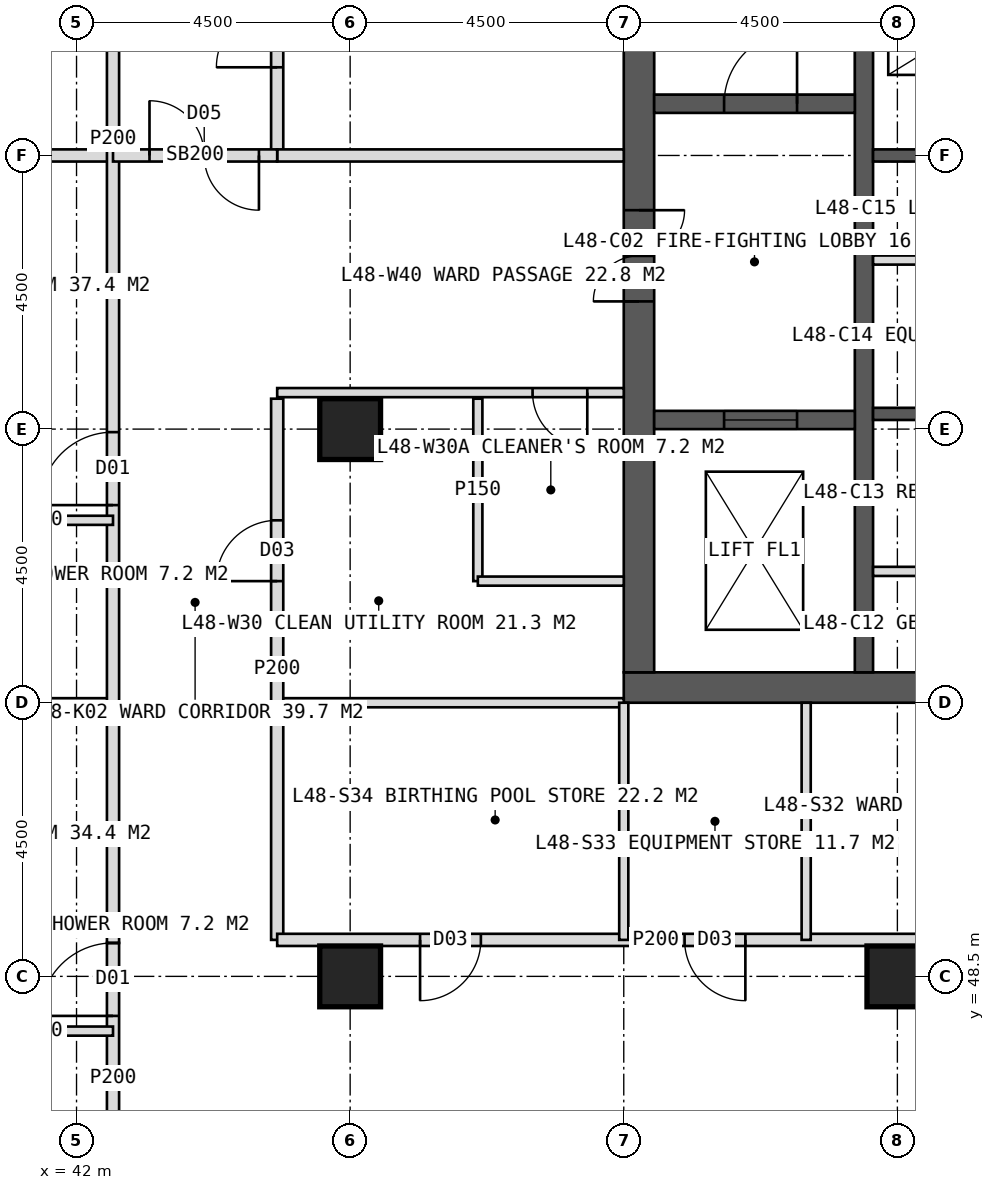
"""IFC4 building model, lengths in metres.
Left out: names, types, materials, properties, quantities, classifications, styles, units other than length and angle.
Written with IfcOpenShell. Run it as: python <this file> out.ifc"""

import sys

from ifc_helpers import new_model, si_unit, direction, frame, frame_2d, origin, origin_2d, place, context, subcontext, project, spatial, rectangle, hollow_rectangle, extrude, element, fill, save


model = new_model("IFC4")
c1 = context("Model", 3, precision=1e-05, world=origin(), true_north=direction((0.0, 1.0)))
c2 = subcontext(c1, "Body", "Model", "MODEL_VIEW")
j1 = project(units=[si_unit("LENGTHUNIT", "METRE"), si_unit("PLANEANGLEUNIT", "RADIAN")], contexts=[c1])
p1 = place(None, origin())
s1 = spatial("IfcSite", under=j1, at=p1, CompositionType="ELEMENT")
p2 = place(p1, origin())
s2 = spatial("IfcBuilding", under=s1, at=p2, CompositionType="ELEMENT")
p3 = place(p2, frame((0.0, 0.0, 201.0)))
s3 = spatial("IfcBuildingStorey", under=s2, at=p3, CompositionType="ELEMENT", Elevation=201.0)
p4 = place(p3, frame((51.0, 53.25, 0.0), z_axis=(0.0, 0.0, 1.0), x_axis=(1.0, 0.0, 0.0)))
e1 = element("IfcWall", 1, at=p4, inside=s3, PredefinedType="SHEAR", context=c2, shape_type="SweptSolid", body=[
    extrude(rectangle(XDim=18.0, YDim=0.5, at=frame_2d((9.0, 0.0))), origin(), (0.0, 0.0, 1.0), 4.0),
])
p5 = place(p4, frame((8.1, 0.0, 0.0)))
e2 = element("IfcOpeningElement", 2, at=p5, cuts=e1, PredefinedType="OPENING", context=c2, shape_type="SweptSolid", body=[
    extrude(rectangle(XDim=1.8, YDim=2.2, at=frame_2d((0.9, 1.1))), frame((0.0, 0.26, 0.0), z_axis=(0.0, -1.0, 0.0), x_axis=(1.0, 0.0, 0.0)), (0.0, 0.0, 1.0), 0.52),
])
p6 = place(p3, frame((51.25, 53.5, 0.0), z_axis=(0.0, 0.0, 1.0), x_axis=(0.0, 1.0, 0.0)))
e3 = element("IfcWall", 3, at=p6, inside=s3, PredefinedType="SHEAR", context=c2, shape_type="SweptSolid", body=[
    extrude(rectangle(XDim=17.0, YDim=0.5, at=frame_2d((8.5, 0.0))), origin(), (0.0, 0.0, 1.0), 4.0),
])
p7 = place(p6, frame((6.1, 0.0, 0.0)))
e4 = element("IfcOpeningElement", 4, at=p7, cuts=e3, PredefinedType="OPENING", context=c2, shape_type="SweptSolid", body=[
    extrude(rectangle(XDim=1.5, YDim=2.2, at=frame_2d((0.75, 1.1))), frame((0.0, 0.26, 0.0), z_axis=(0.0, -1.0, 0.0), x_axis=(1.0, 0.0, 0.0)), (0.0, 0.0, 1.0), 0.52),
])
p8 = place(p3, frame((54.95, 53.5, 0.0), z_axis=(0.0, 0.0, 1.0), x_axis=(0.0, 1.0, 0.0)))
e5 = element("IfcWall", 5, at=p8, inside=s3, PredefinedType="SHEAR", context=c2, shape_type="SweptSolid", body=[
    extrude(rectangle(XDim=17.0, YDim=0.3, at=frame_2d((8.5, 0.0))), origin(), (0.0, 0.0, 1.0), 4.0),
])
for number, where, z_axis, x_axis in (
    (6, (55.1, 57.75, 0.0), (0.0, 0.0, 1.0), (1.0, 0.0, 0.0)),
    (7, (55.1, 62.0, 0.0), (0.0, 0.0, 1.0), (1.0, 0.0, 0.0)),
):
    element("IfcWall", number, at=place(p3, frame(where, z_axis=z_axis, x_axis=x_axis)), inside=s3, PredefinedType="SHEAR", context=c2, shape_type="SweptSolid", body=[
        extrude(rectangle(XDim=3.05, YDim=0.2, at=frame_2d((1.525, 0.0))), origin(), (0.0, 0.0, 1.0), 4.0),
    ])
p9 = place(p3, frame((51.5, 62.85, 0.0), z_axis=(0.0, 0.0, 1.0), x_axis=(1.0, 0.0, 0.0)))
e8 = element("IfcWall", 8, at=p9, inside=s3, PredefinedType="SHEAR", context=c2, shape_type="SweptSolid", body=[
    extrude(rectangle(XDim=3.3, YDim=0.3, at=frame_2d((1.65, 0.0))), origin(), (0.0, 0.0, 1.0), 4.0),
])
p10 = place(p9, frame((1.15, 0.0, 0.0)))
e9 = element("IfcOpeningElement", 9, at=p10, cuts=e8, PredefinedType="OPENING", context=c2, shape_type="SweptSolid", body=[
    extrude(rectangle(XDim=1.2, YDim=2.1, at=frame_2d((0.6, 1.05))), frame((0.0, 0.16, 0.0), z_axis=(0.0, -1.0, 0.0), x_axis=(1.0, 0.0, 0.0)), (0.0, 0.0, 1.0), 0.32),
])
p11 = place(p3, frame((51.5, 57.65, 0.0), z_axis=(0.0, 0.0, 1.0), x_axis=(1.0, 0.0, 0.0)))
e10 = element("IfcWall", 10, at=p11, inside=s3, PredefinedType="SHEAR", context=c2, shape_type="SweptSolid", body=[
    extrude(rectangle(XDim=3.3, YDim=0.3, at=frame_2d((1.65, 0.0))), origin(), (0.0, 0.0, 1.0), 4.0),
])
p12 = place(p11, frame((1.15, 0.0, 0.0)))
e11 = element("IfcOpeningElement", 11, at=p12, cuts=e10, PredefinedType="OPENING", context=c2, shape_type="SweptSolid", body=[
    extrude(rectangle(XDim=1.2, YDim=2.2, at=frame_2d((0.6, 1.1))), frame((0.0, 0.16, 0.0), z_axis=(0.0, -1.0, 0.0), x_axis=(1.0, 0.0, 0.0)), (0.0, 0.0, 1.0), 0.32),
])
for number, where, z_axis, x_axis in (
    (12, (46.5, 48.5, 0.0), (0.0, 0.0, 1.0), (1.0, 0.0, 0.0)),
    (13, (55.5, 48.5, 0.0), (0.0, 0.0, 1.0), (1.0, 0.0, 0.0)),
    (14, (46.5, 57.5, 0.0), (0.0, 0.0, 1.0), (1.0, 0.0, 0.0)),
):
    element("IfcColumn", number, at=place(p3, frame(where, z_axis=z_axis, x_axis=x_axis)), inside=s3, PredefinedType="COLUMN", context=c2, shape_type="SweptSolid", body=[
        extrude(hollow_rectangle(XDim=1.0, YDim=1.0, WallThickness=0.1, at=origin_2d()), origin(), (0.0, 0.0, 1.0), 4.0),
    ])
p13 = place(p3, frame((42.6, 53.0, 0.0), z_axis=(0.0, 0.0, 1.0), x_axis=(-1.0, 0.0, 0.0)))
e15 = element("IfcWall", 15, at=p13, inside=s3, PredefinedType="PARTITIONING", context=c2, shape_type="SweptSolid", body=[
    extrude(rectangle(XDim=4.95, YDim=0.15, at=frame_2d((2.475, 0.0))), origin(), (0.0, 0.0, 1.0), 3.75),
])
p14 = place(p3, frame((42.6, 62.0, 0.0), z_axis=(0.0, 0.0, 1.0), x_axis=(-1.0, 0.0, 0.0)))
e16 = element("IfcWall", 16, at=p14, inside=s3, PredefinedType="SOLIDWALL", context=c2, shape_type="SweptSolid", body=[
    extrude(rectangle(XDim=4.95, YDim=0.2, at=frame_2d((2.475, 0.0))), origin(), (0.0, 0.0, 1.0), 2.95),
])
p15 = place(p3, frame((42.6, 44.6, 0.0), z_axis=(0.0, 0.0, 1.0), x_axis=(0.0, 1.0, 0.0)))
e17 = element("IfcWall", 17, at=p15, inside=s3, PredefinedType="PARTITIONING", context=c2, shape_type="SweptSolid", body=[
    extrude(rectangle(XDim=4.45, YDim=0.2, at=frame_2d((2.225, 0.0))), origin(), (0.0, 0.0, 1.0), 2.85),
])
p16 = place(p15, frame((3.25, 0.0, 0.0)))
e18 = element("IfcOpeningElement", 18, at=p16, cuts=e17, PredefinedType="OPENING", context=c2, shape_type="SweptSolid", body=[
    extrude(rectangle(XDim=1.2, YDim=2.2, at=frame_2d((0.6, 1.1))), frame((0.0, 0.11, 0.0), z_axis=(0.0, -1.0, 0.0), x_axis=(1.0, 0.0, 0.0)), (0.0, 0.0, 1.0), 0.22),
])
p17 = place(p3, frame((42.6, 49.05, 0.0), z_axis=(0.0, 0.0, 1.0), x_axis=(0.0, 1.0, 0.0)))
e19 = element("IfcWall", 19, at=p17, inside=s3, PredefinedType="PARTITIONING", context=c2, shape_type="SweptSolid", body=[
    extrude(rectangle(XDim=26.45, YDim=0.2, at=frame_2d((13.225, 0.0))), origin(), (0.0, 0.0, 1.0), 3.75),
])
p18 = place(p17, frame((7.2, 0.0, 0.0)))
e20 = element("IfcOpeningElement", 20, at=p18, cuts=e19, PredefinedType="OPENING", context=c2, shape_type="SweptSolid", body=[
    extrude(rectangle(XDim=1.2, YDim=2.2, at=frame_2d((0.6, 1.1))), frame((0.0, 0.11, 0.0), z_axis=(0.0, -1.0, 0.0), x_axis=(1.0, 0.0, 0.0)), (0.0, 0.0, 1.0), 0.22),
])
p19 = place(p17, frame((16.2, 0.0, 0.0)))
e21 = element("IfcOpeningElement", 21, at=p19, cuts=e19, PredefinedType="OPENING", context=c2, shape_type="SweptSolid", body=[
    extrude(rectangle(XDim=1.2, YDim=2.2, at=frame_2d((0.6, 1.1))), frame((0.0, 0.11, 0.0), z_axis=(0.0, -1.0, 0.0), x_axis=(1.0, 0.0, 0.0)), (0.0, 0.0, 1.0), 0.22),
])
p20 = place(p17, frame((25.2, 0.0, 0.0)))
e22 = element("IfcOpeningElement", 22, at=p20, cuts=e19, PredefinedType="OPENING", context=c2, shape_type="SweptSolid", body=[
    extrude(rectangle(XDim=1.2, YDim=2.2, at=frame_2d((0.6, 1.1))), frame((0.0, 0.11, 0.0), z_axis=(0.0, -1.0, 0.0), x_axis=(1.0, 0.0, 0.0)), (0.0, 0.0, 1.0), 0.22),
])
for number, where, z_axis, x_axis in (
    (23, (42.6, 47.6, 0.0), (0.0, 0.0, 1.0), (-1.0, 0.0, 0.0)),
    (24, (42.6, 56.0, 0.0), (0.0, 0.0, 1.0), (-1.0, 0.0, 0.0)),
):
    element("IfcWall", number, at=place(p3, frame(where, z_axis=z_axis, x_axis=x_axis)), inside=s3, PredefinedType="PARTITIONING", context=c2, shape_type="SweptSolid", body=[
        extrude(rectangle(XDim=2.4, YDim=0.15, at=frame_2d((1.2, 0.0))), origin(), (0.0, 0.0, 1.0), 3.75),
    ])
p21 = place(p3, frame((51.0, 53.0, 0.0), z_axis=(0.0, 0.0, 1.0), x_axis=(-1.0, 0.0, 0.0)))
e25 = element("IfcWall", 25, at=p21, inside=s3, PredefinedType="PARTITIONING", context=c2, shape_type="SweptSolid", body=[
    extrude(rectangle(XDim=5.7, YDim=0.15, at=frame_2d((2.85, 0.0))), origin(), (0.0, 0.0, 1.0), 3.75),
])
p22 = place(p3, frame((45.3, 49.1, 0.0), z_axis=(0.0, 0.0, 1.0), x_axis=(0.0, 1.0, 0.0)))
e26 = element("IfcWall", 26, at=p22, inside=s3, PredefinedType="PARTITIONING", context=c2, shape_type="SweptSolid", body=[
    extrude(rectangle(XDim=8.9, YDim=0.2, at=frame_2d((4.45, 0.0))), origin(), (0.0, 0.0, 1.0), 3.75),
])
p23 = place(p22, frame((5.9, 0.0, 0.0)))
e27 = element("IfcOpeningElement", 27, at=p23, cuts=e26, PredefinedType="OPENING", context=c2, shape_type="SweptSolid", body=[
    extrude(rectangle(XDim=1.0, YDim=2.1, at=frame_2d((0.5, 1.05))), frame((0.0, 0.11, 0.0), z_axis=(0.0, -1.0, 0.0), x_axis=(1.0, 0.0, 0.0)), (0.0, 0.0, 1.0), 0.22),
])
p24 = place(p3, frame((45.3, 62.0, 0.0), z_axis=(0.0, 0.0, 1.0), x_axis=(0.0, 1.0, 0.0)))
e28 = element("IfcWall", 28, at=p24, inside=s3, PredefinedType="PARTITIONING", context=c2, shape_type="SweptSolid", body=[
    extrude(rectangle(XDim=14.7, YDim=0.2, at=frame_2d((7.35, 0.0))), origin(), (0.0, 0.0, 1.0), 3.75),
])
p25 = place(p24, frame((1.45, 0.0, 0.0)))
e29 = element("IfcOpeningElement", 29, at=p25, cuts=e28, PredefinedType="OPENING", context=c2, shape_type="SweptSolid", body=[
    extrude(rectangle(XDim=1.0, YDim=2.1, at=frame_2d((0.5, 1.05))), frame((0.0, 0.11, 0.0), z_axis=(0.0, -1.0, 0.0), x_axis=(1.0, 0.0, 0.0)), (0.0, 0.0, 1.0), 0.22),
])
p26 = place(p24, frame((11.35, 0.0, 0.0)))
e30 = element("IfcOpeningElement", 30, at=p26, cuts=e28, PredefinedType="OPENING", context=c2, shape_type="SweptSolid", body=[
    extrude(rectangle(XDim=1.0, YDim=2.1, at=frame_2d((0.5, 1.05))), frame((0.0, 0.11, 0.0), z_axis=(0.0, -1.0, 0.0), x_axis=(1.0, 0.0, 0.0)), (0.0, 0.0, 1.0), 0.22),
])
p27 = place(p3, frame((51.0, 58.1, 0.0), z_axis=(0.0, 0.0, 1.0), x_axis=(-1.0, 0.0, 0.0)))
e31 = element("IfcWall", 31, at=p27, inside=s3, PredefinedType="PARTITIONING", context=c2, shape_type="SweptSolid", body=[
    extrude(rectangle(XDim=5.7, YDim=0.15, at=frame_2d((2.85, 0.0))), origin(), (0.0, 0.0, 1.0), 3.75),
])
p28 = place(p27, frame((0.6, 0.0, 0.0)))
e32 = element("IfcOpeningElement", 32, at=p28, cuts=e31, PredefinedType="OPENING", context=c2, shape_type="SweptSolid", body=[
    extrude(rectangle(XDim=0.9, YDim=2.1, at=frame_2d((0.45, 1.05))), frame((0.0, 0.085, 0.0), z_axis=(0.0, -1.0, 0.0), x_axis=(1.0, 0.0, 0.0)), (0.0, 0.0, 1.0), 0.17),
])
p29 = place(p3, frame((51.0, 62.0, 0.0), z_axis=(0.0, 0.0, 1.0), x_axis=(-1.0, 0.0, 0.0)))
e33 = element("IfcWall", 33, at=p29, inside=s3, PredefinedType="SOLIDWALL", context=c2, shape_type="SweptSolid", body=[
    extrude(rectangle(XDim=5.7, YDim=0.2, at=frame_2d((2.85, 0.0))), origin(), (0.0, 0.0, 1.0), 2.95),
])
p30 = place(p3, frame((48.6, 55.0, 0.0), z_axis=(0.0, 0.0, 1.0), x_axis=(0.0, 1.0, 0.0)))
e34 = element("IfcWall", 34, at=p30, inside=s3, PredefinedType="PARTITIONING", context=c2, shape_type="SweptSolid", body=[
    extrude(rectangle(XDim=3.0, YDim=0.15, at=frame_2d((1.5, 0.0))), origin(), (0.0, 0.0, 1.0), 3.75),
])
p31 = place(p3, frame((51.0, 55.0, 0.0), z_axis=(0.0, 0.0, 1.0), x_axis=(-1.0, 0.0, 0.0)))
e35 = element("IfcWall", 35, at=p31, inside=s3, PredefinedType="PARTITIONING", context=c2, shape_type="SweptSolid", body=[
    extrude(rectangle(XDim=2.4, YDim=0.15, at=frame_2d((1.2, 0.0))), origin(), (0.0, 0.0, 1.0), 3.75),
])
p32 = place(p3, frame((57.75, 49.1, 0.0), z_axis=(0.0, 0.0, 1.0), x_axis=(-1.0, 0.0, 0.0)))
e36 = element("IfcWall", 36, at=p32, inside=s3, PredefinedType="PARTITIONING", context=c2, shape_type="SweptSolid", body=[
    extrude(rectangle(XDim=12.45, YDim=0.2, at=frame_2d((6.225, 0.0))), origin(), (0.0, 0.0, 1.0), 3.75),
])
p33 = place(p32, frame((0.325, 0.0, 0.0)))
e37 = element("IfcOpeningElement", 37, at=p33, cuts=e36, PredefinedType="OPENING", context=c2, shape_type="SweptSolid", body=[
    extrude(rectangle(XDim=1.0, YDim=2.1, at=frame_2d((0.5, 1.05))), frame((0.0, 0.11, 0.0), z_axis=(0.0, -1.0, 0.0), x_axis=(1.0, 0.0, 0.0)), (0.0, 0.0, 1.0), 0.22),
])
p34 = place(p32, frame((4.75, 0.0, 0.0)))
e38 = element("IfcOpeningElement", 38, at=p34, cuts=e36, PredefinedType="OPENING", context=c2, shape_type="SweptSolid", body=[
    extrude(rectangle(XDim=1.0, YDim=2.1, at=frame_2d((0.5, 1.05))), frame((0.0, 0.11, 0.0), z_axis=(0.0, -1.0, 0.0), x_axis=(1.0, 0.0, 0.0)), (0.0, 0.0, 1.0), 0.22),
])
p35 = place(p32, frame((9.1, 0.0, 0.0)))
e39 = element("IfcOpeningElement", 39, at=p35, cuts=e36, PredefinedType="OPENING", context=c2, shape_type="SweptSolid", body=[
    extrude(rectangle(XDim=1.0, YDim=2.1, at=frame_2d((0.5, 1.05))), frame((0.0, 0.11, 0.0), z_axis=(0.0, -1.0, 0.0), x_axis=(1.0, 0.0, 0.0)), (0.0, 0.0, 1.0), 0.22),
])
for number, where, z_axis, x_axis in (
    (40, (54.0, 53.0, 0.0), (0.0, 0.0, 1.0), (0.0, -1.0, 0.0)),
    (41, (51.0, 53.0, 0.0), (0.0, 0.0, 1.0), (0.0, -1.0, 0.0)),
):
    element("IfcWall", number, at=place(p3, frame(where, z_axis=z_axis, x_axis=x_axis)), inside=s3, PredefinedType="PARTITIONING", context=c2, shape_type="SweptSolid", body=[
        extrude(rectangle(XDim=3.9, YDim=0.15, at=frame_2d((1.95, 0.0))), origin(), (0.0, 0.0, 1.0), 3.75),
    ])
p36 = place(p3, frame((45.3, 62.0, 0.0), z_axis=(0.0, 0.0, 1.0), x_axis=(-1.0, 0.0, 0.0)))
e42 = element("IfcWall", 42, at=p36, inside=s3, PredefinedType="SOLIDWALL", context=c2, shape_type="SweptSolid", body=[
    extrude(rectangle(XDim=2.7, YDim=0.2, at=frame_2d((1.35, 0.0))), origin(), (0.0, 0.0, 1.0), 2.95),
])
p37 = place(p36, frame((0.3, 0.0, 0.0)))
e43 = element("IfcOpeningElement", 43, at=p37, cuts=e42, PredefinedType="OPENING", context=c2, shape_type="SweptSolid", body=[
    extrude(rectangle(XDim=1.8, YDim=2.2, at=frame_2d((0.9, 1.1))), frame((0.0, 0.11, 0.0), z_axis=(0.0, -1.0, 0.0), x_axis=(1.0, 0.0, 0.0)), (0.0, 0.0, 1.0), 0.22),
])
for number, where, z_axis, x_axis in (
    (44, (55.1, 55.16, 0.0), (0.0, 0.0, 1.0), (1.0, 0.0, 0.0)),
    (45, (55.1, 60.28, 0.0), (0.0, 0.0, 1.0), (1.0, 0.0, 0.0)),
):
    element("IfcWall", number, at=place(p3, frame(where, z_axis=z_axis, x_axis=x_axis)), inside=s3, PredefinedType="PARTITIONING", context=c2, shape_type="SweptSolid", body=[
        extrude(rectangle(XDim=3.05, YDim=0.15, at=frame_2d((1.525, 0.0))), origin(), (0.0, 0.0, 1.0), 3.75),
    ])
p38 = place(p16, origin())
e46 = element("IfcDoor", 46, at=p38, inside=s3, OperationType="SINGLE_SWING_LEFT", PredefinedType="DOOR", context=c2, shape_type="SweptSolid", body=[
    extrude(rectangle(XDim=1.2, YDim=2.2, at=frame_2d((0.6, 1.1))), frame((0.0, 0.025, 0.0), z_axis=(0.0, -1.0, 0.0), x_axis=(1.0, 0.0, 0.0)), (0.0, 0.0, 1.0), 0.05),
])
fill(e18, e46)
p39 = place(p18, origin())
e47 = element("IfcDoor", 47, at=p39, inside=s3, OperationType="SINGLE_SWING_LEFT", PredefinedType="DOOR", context=c2, shape_type="SweptSolid", body=[
    extrude(rectangle(XDim=1.2, YDim=2.2, at=frame_2d((0.6, 1.1))), frame((0.0, 0.025, 0.0), z_axis=(0.0, -1.0, 0.0), x_axis=(1.0, 0.0, 0.0)), (0.0, 0.0, 1.0), 0.05),
])
fill(e20, e47)
p40 = place(p28, origin())
e48 = element("IfcDoor", 48, at=p40, inside=s3, OperationType="SINGLE_SWING_LEFT", PredefinedType="DOOR", context=c2, shape_type="SweptSolid", body=[
    extrude(rectangle(XDim=0.9, YDim=2.1, at=frame_2d((0.45, 1.05))), frame((0.0, 0.025, 0.0), z_axis=(0.0, -1.0, 0.0), x_axis=(1.0, 0.0, 0.0)), (0.0, 0.0, 1.0), 0.05),
])
fill(e32, e48)
p41 = place(p23, origin())
e49 = element("IfcDoor", 49, at=p41, inside=s3, OperationType="SINGLE_SWING_LEFT", PredefinedType="DOOR", context=c2, shape_type="SweptSolid", body=[
    extrude(rectangle(XDim=1.0, YDim=2.1, at=frame_2d((0.5, 1.05))), frame((0.0, 0.025, 0.0), z_axis=(0.0, -1.0, 0.0), x_axis=(1.0, 0.0, 0.0)), (0.0, 0.0, 1.0), 0.05),
])
fill(e27, e49)
p42 = place(p25, origin())
e50 = element("IfcDoor", 50, at=p42, inside=s3, OperationType="SINGLE_SWING_LEFT", PredefinedType="DOOR", context=c2, shape_type="SweptSolid", body=[
    extrude(rectangle(XDim=1.0, YDim=2.1, at=frame_2d((0.5, 1.05))), frame((0.0, 0.025, 0.0), z_axis=(0.0, -1.0, 0.0), x_axis=(1.0, 0.0, 0.0)), (0.0, 0.0, 1.0), 0.05),
])
fill(e29, e50)
p43 = place(p34, origin())
e51 = element("IfcDoor", 51, at=p43, inside=s3, OperationType="SINGLE_SWING_LEFT", PredefinedType="DOOR", context=c2, shape_type="SweptSolid", body=[
    extrude(rectangle(XDim=1.0, YDim=2.1, at=frame_2d((0.5, 1.05))), frame((0.0, 0.025, 0.0), z_axis=(0.0, -1.0, 0.0), x_axis=(1.0, 0.0, 0.0)), (0.0, 0.0, 1.0), 0.05),
])
fill(e38, e51)
p44 = place(p35, origin())
e52 = element("IfcDoor", 52, at=p44, inside=s3, OperationType="SINGLE_SWING_RIGHT", PredefinedType="DOOR", context=c2, shape_type="SweptSolid", body=[
    extrude(rectangle(XDim=1.0, YDim=2.1, at=frame_2d((0.5, 1.05))), frame((0.0, 0.025, 0.0), z_axis=(0.0, -1.0, 0.0), x_axis=(1.0, 0.0, 0.0)), (0.0, 0.0, 1.0), 0.05),
])
fill(e39, e52)
p45 = place(p37, origin())
e53 = element("IfcDoor", 53, at=p45, inside=s3, OperationType="DOUBLE_DOOR_DOUBLE_SWING", PredefinedType="DOOR", context=c2, shape_type="SweptSolid", body=[
    extrude(rectangle(XDim=1.8, YDim=2.2, at=frame_2d((0.9, 1.1))), frame((0.0, 0.025, 0.0), z_axis=(0.0, -1.0, 0.0), x_axis=(1.0, 0.0, 0.0)), (0.0, 0.0, 1.0), 0.05),
])
fill(e43, e53)
p46 = place(p7, origin())
e54 = element("IfcDoor", 54, at=p46, inside=s3, OperationType="DOUBLE_DOOR_SINGLE_SWING", PredefinedType="DOOR", context=c2, shape_type="SweptSolid", body=[
    extrude(rectangle(XDim=1.5, YDim=2.2, at=frame_2d((0.75, 1.1))), frame((0.0, 0.025, 0.0), z_axis=(0.0, -1.0, 0.0), x_axis=(1.0, 0.0, 0.0)), (0.0, 0.0, 1.0), 0.05),
])
fill(e4, e54)
p47 = place(p10, origin())
e55 = element("IfcDoor", 55, at=p47, inside=s3, OperationType="SINGLE_SWING_RIGHT", PredefinedType="DOOR", context=c2, shape_type="SweptSolid", body=[
    extrude(rectangle(XDim=1.2, YDim=2.1, at=frame_2d((0.6, 1.05))), frame((0.0, 0.025, 0.0), z_axis=(0.0, -1.0, 0.0), x_axis=(1.0, 0.0, 0.0)), (0.0, 0.0, 1.0), 0.05),
])
fill(e9, e55)
p48 = place(p12, origin())
e56 = element("IfcDoor", 56, at=p48, inside=s3, OperationType="SLIDING_TO_LEFT", PredefinedType="DOOR", context=c2, shape_type="SweptSolid", body=[
    extrude(rectangle(XDim=1.2, YDim=2.2, at=frame_2d((0.6, 1.1))), frame((0.0, 0.025, 0.0), z_axis=(0.0, -1.0, 0.0), x_axis=(1.0, 0.0, 0.0)), (0.0, 0.0, 1.0), 0.05),
])
fill(e11, e56)
save(model, sys.argv[1])
